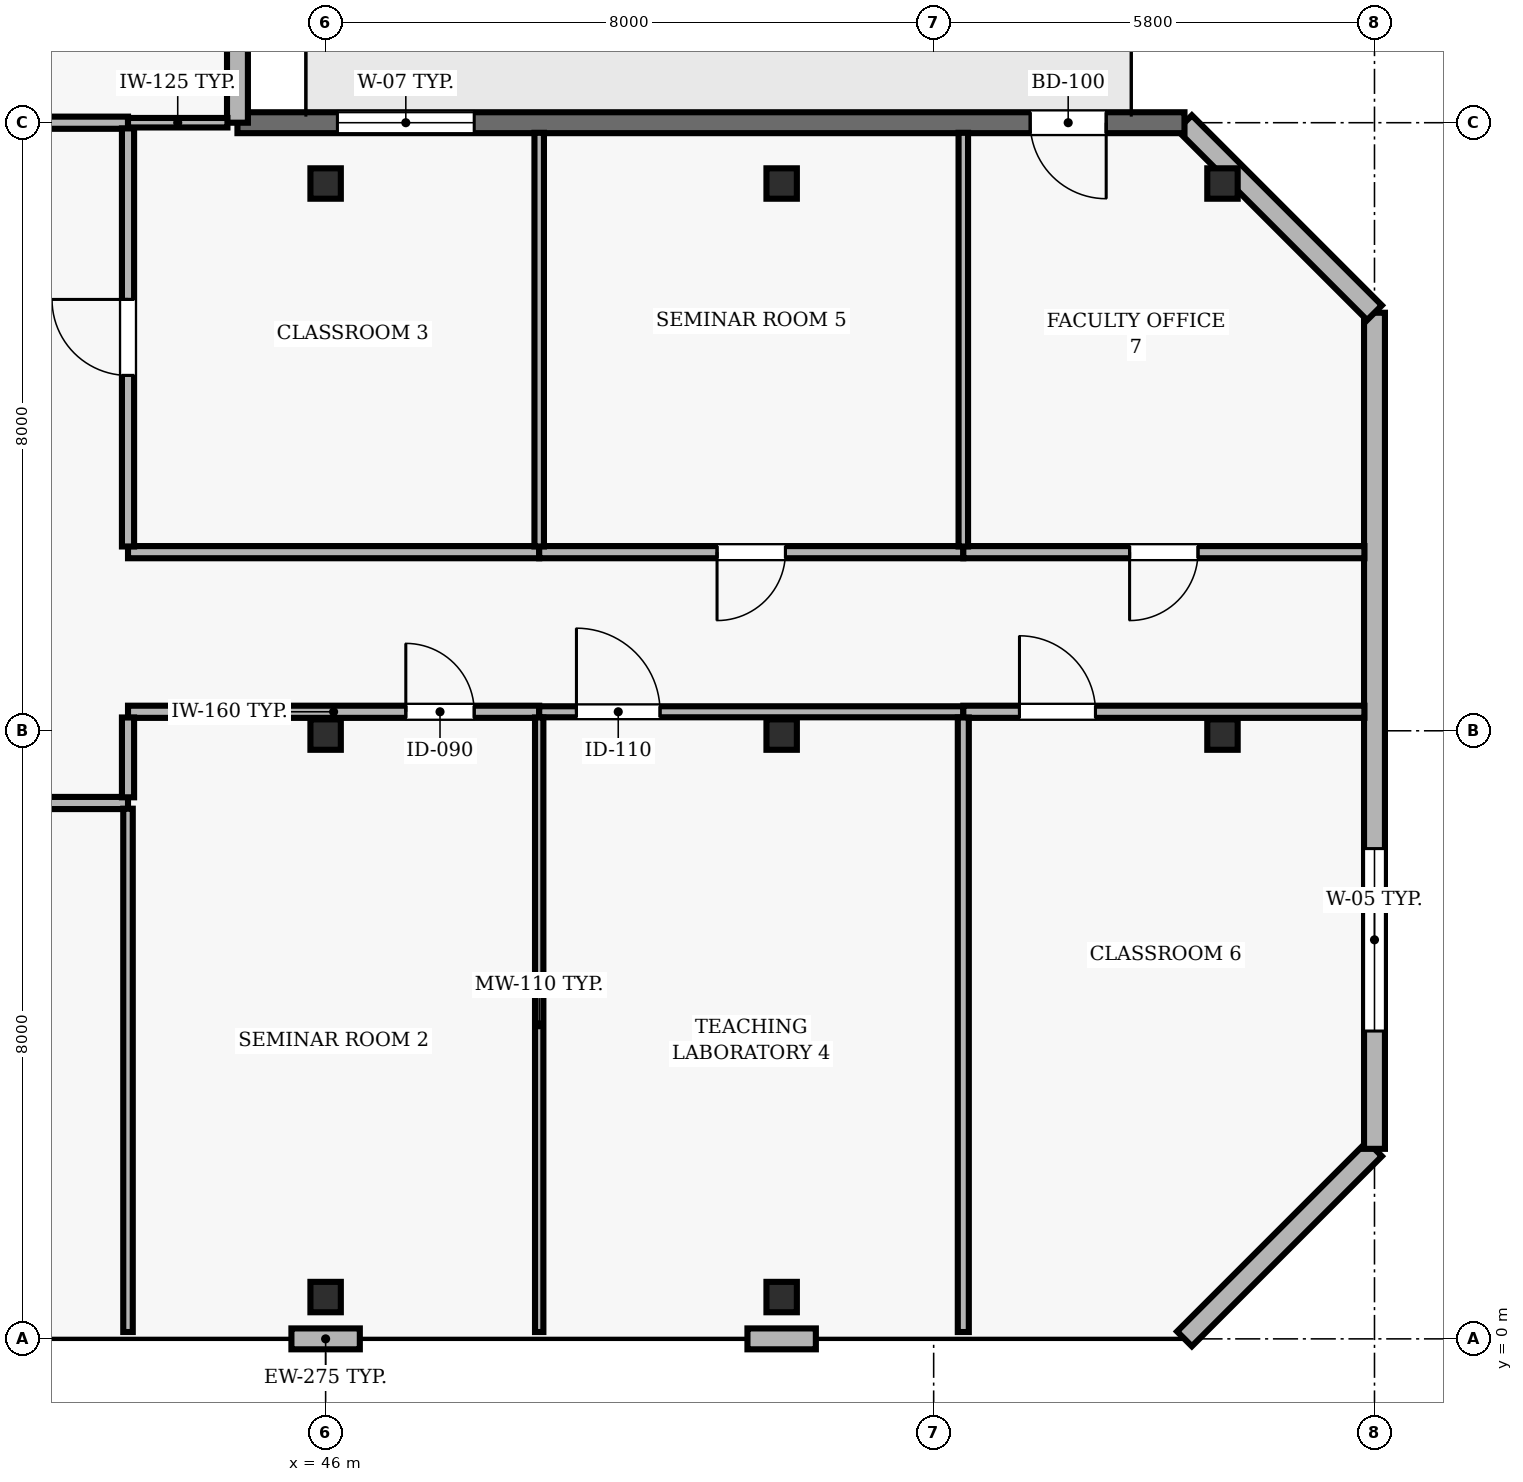
"""IFC4 building model, lengths in metres.
Left out: names, types, materials, properties, quantities, classifications, styles, units other than length and angle.
Written with IfcOpenShell. Run it as: python <this file> out.ifc"""

import sys

from ifc_helpers import new_model, si_unit, direction, frame, frame_2d, origin, origin_2d, place, context, subcontext, project, spatial, rectangle, hollow_rectangle, extrude, element, fill, save


model = new_model("IFC4")
c1 = context("Model", 3, precision=1e-05, world=origin(), true_north=direction((0.0, 1.0)))
c2 = subcontext(c1, "Body", "Model", "MODEL_VIEW")
j1 = project(units=[si_unit("LENGTHUNIT", "METRE"), si_unit("PLANEANGLEUNIT", "RADIAN")], contexts=[c1])
p1 = place(None, origin())
s1 = spatial("IfcSite", under=j1, at=p1, CompositionType="ELEMENT")
p2 = place(p1, origin())
s2 = spatial("IfcBuilding", under=s1, at=p2, CompositionType="ELEMENT")
p3 = place(p2, frame((0.0, 0.0, 256.0)))
s3 = spatial("IfcBuildingStorey", under=s2, at=p3, CompositionType="ELEMENT", Elevation=256.0)
for number, where, z_axis, x_axis in (
    (1, (46.0, 0.55, 0.0), (0.0, 0.0, 1.0), (1.0, 0.0, 0.0)),
    (2, (46.0, 7.95, 0.0), (0.0, 0.0, 1.0), (1.0, 0.0, 0.0)),
    (3, (46.0, 15.2, 0.0), (0.0, 0.0, 1.0), (1.0, 0.0, 0.0)),
    (4, (52.0, 0.55, 0.0), (0.0, 0.0, 1.0), (1.0, 0.0, 0.0)),
    (5, (52.0, 7.95, 0.0), (0.0, 0.0, 1.0), (1.0, 0.0, 0.0)),
    (6, (52.0, 15.2, 0.0), (0.0, 0.0, 1.0), (1.0, 0.0, 0.0)),
    (7, (57.8, 7.95, 0.0), (0.0, 0.0, 1.0), (1.0, 0.0, 0.0)),
    (8, (57.8, 15.2, 0.0), (0.0, 0.0, 1.0), (1.0, 0.0, 0.0)),
):
    element("IfcColumn", number, at=place(p3, frame(where, z_axis=z_axis, x_axis=x_axis)), inside=s3, PredefinedType="COLUMN", context=c2, shape_type="SweptSolid", body=[
        extrude(hollow_rectangle(XDim=0.4, YDim=0.4, WallThickness=0.02, at=origin_2d()), origin(), (0.0, 0.0, 1.0), 3.9),
    ])
for number, where, z_axis, x_axis in (
    (9, (45.55, 0.0, 0.0), (0.0, 0.0, 1.0), (1.0, 0.0, 0.0)),
    (10, (51.55, 0.0, 0.0), (0.0, 0.0, 1.0), (1.0, 0.0, 0.0)),
):
    element("IfcWall", number, at=place(p3, frame(where, z_axis=z_axis, x_axis=x_axis)), inside=s3, PredefinedType="SOLIDWALL", context=c2, shape_type="SweptSolid", body=[
        extrude(rectangle(XDim=0.9, YDim=0.275, at=frame_2d((0.45, 0.0))), origin(), (0.0, 0.0, 1.0), 3.69),
    ])
p4 = place(p3, frame((57.3, 0.0, 0.0), z_axis=(0.0, 0.0, 1.0), x_axis=(0.707106781187, 0.707106781187, 0.0)))
e11 = element("IfcWall", 11, at=p4, inside=s3, PredefinedType="SOLIDWALL", context=c2, shape_type="SweptSolid", body=[
    extrude(rectangle(XDim=3.536, YDim=0.275, at=frame_2d((1.768, 0.0))), origin(), (0.0, 0.0, 1.0), 3.69),
])
p5 = place(p3, frame((59.8, 2.5, 0.0), z_axis=(0.0, 0.0, 1.0), x_axis=(0.0, 1.0, 0.0)))
e12 = element("IfcWall", 12, at=p5, inside=s3, PredefinedType="SOLIDWALL", context=c2, shape_type="SweptSolid", body=[
    extrude(rectangle(XDim=11.0, YDim=0.275, at=frame_2d((5.5, 0.0))), origin(), (0.0, 0.0, 1.0), 3.69),
])
p6 = place(p5, frame((1.55, 0.0, 0.9)))
e13 = element("IfcOpeningElement", 13, at=p6, cuts=e12, PredefinedType="OPENING", context=c2, shape_type="SweptSolid", body=[
    extrude(rectangle(XDim=2.4, YDim=1.6, at=frame_2d((1.2, 0.8))), frame((0.0, 0.147, 0.0), z_axis=(0.0, -1.0, 0.0), x_axis=(1.0, 0.0, 0.0)), (0.0, 0.0, 1.0), 0.295),
])
p7 = place(p3, frame((59.8, 13.5, 0.0), z_axis=(0.0, 0.0, 1.0), x_axis=(-0.707106781187, 0.707106781187, 0.0)))
e14 = element("IfcWall", 14, at=p7, inside=s3, PredefinedType="SOLIDWALL", context=c2, shape_type="SweptSolid", body=[
    extrude(rectangle(XDim=3.536, YDim=0.275, at=frame_2d((1.768, 0.0))), origin(), (0.0, 0.0, 1.0), 3.69),
])
p8 = place(p3, frame((57.3, 16.0, 0.0), z_axis=(0.0, 0.0, 1.0), x_axis=(-1.0, 0.0, 0.0)))
e15 = element("IfcWall", 15, at=p8, inside=s3, PredefinedType="SOLIDWALL", context=c2, shape_type="SweptSolid", body=[
    extrude(rectangle(XDim=12.46, YDim=0.275, at=frame_2d((6.23, 0.0))), origin(), (0.0, 0.0, 1.0), 3.69),
])
p9 = place(p8, frame((1.03, 0.0, 0.0)))
e16 = element("IfcOpeningElement", 16, at=p9, cuts=e15, PredefinedType="OPENING", context=c2, shape_type="SweptSolid", body=[
    extrude(rectangle(XDim=1.0, YDim=2.2, at=frame_2d((0.5, 1.1))), frame((0.0, 0.147, 0.0), z_axis=(0.0, -1.0, 0.0), x_axis=(1.0, 0.0, 0.0)), (0.0, 0.0, 1.0), 0.295),
])
p10 = place(p8, frame((9.345, 0.0, 0.9)))
e17 = element("IfcOpeningElement", 17, at=p10, cuts=e15, PredefinedType="OPENING", context=c2, shape_type="SweptSolid", body=[
    extrude(rectangle(XDim=1.8, YDim=1.8, at=frame_2d((0.9, 0.9))), frame((0.0, 0.147, 0.0), z_axis=(0.0, -1.0, 0.0), x_axis=(1.0, 0.0, 0.0)), (0.0, 0.0, 1.0), 0.295),
])
p11 = place(p3, frame((44.84, 16.0, 0.0), z_axis=(0.0, 0.0, 1.0), x_axis=(0.0, 1.0, 0.0)))
e18 = element("IfcWall", 18, at=p11, inside=s3, PredefinedType="SOLIDWALL", context=c2, shape_type="SweptSolid", body=[
    extrude(rectangle(XDim=8.3, YDim=0.275, at=frame_2d((4.15, 0.0))), origin(), (0.0, 0.0, 1.0), 3.69),
])
p12 = place(p11, frame((2.95, 0.0, 0.9)))
e19 = element("IfcOpeningElement", 19, at=p12, cuts=e18, PredefinedType="OPENING", context=c2, shape_type="SweptSolid", body=[
    extrude(rectangle(XDim=2.4, YDim=1.8, at=frame_2d((1.2, 0.9))), frame((0.0, 0.147, 0.0), z_axis=(0.0, -1.0, 0.0), x_axis=(1.0, 0.0, 0.0)), (0.0, 0.0, 1.0), 0.295),
])
p13 = place(p3, frame((38.05, 7.05, 0.0), z_axis=(0.0, 0.0, 1.0), x_axis=(1.0, 0.0, 0.0)))
e20 = element("IfcWall", 20, at=p13, inside=s3, PredefinedType="PARTITIONING", context=c2, shape_type="SweptSolid", body=[
    extrude(rectangle(XDim=5.35, YDim=0.16, at=frame_2d((2.675, 0.0))), origin(), (0.0, 0.0, 1.0), 3.69),
])
p14 = place(p13, frame((2.175, 0.0, 0.0)))
e21 = element("IfcOpeningElement", 21, at=p14, cuts=e20, PredefinedType="OPENING", context=c2, shape_type="SweptSolid", body=[
    extrude(rectangle(XDim=1.0, YDim=2.1, at=frame_2d((0.5, 1.05))), frame((0.0, 0.09, 0.0), z_axis=(0.0, -1.0, 0.0), x_axis=(1.0, 0.0, 0.0)), (0.0, 0.0, 1.0), 0.18),
])
p15 = place(p3, frame((43.4, 8.25, 0.0), z_axis=(0.0, 0.0, 1.0), x_axis=(1.0, 0.0, 0.0)))
e22 = element("IfcWall", 22, at=p15, inside=s3, PredefinedType="PARTITIONING", context=c2, shape_type="SweptSolid", body=[
    extrude(rectangle(XDim=5.41, YDim=0.16, at=frame_2d((2.705, 0.0))), origin(), (0.0, 0.0, 1.0), 3.221),
])
p16 = place(p15, frame((3.655, 0.0, 0.0)))
e23 = element("IfcOpeningElement", 23, at=p16, cuts=e22, PredefinedType="OPENING", context=c2, shape_type="SweptSolid", body=[
    extrude(rectangle(XDim=0.9, YDim=2.1, at=frame_2d((0.45, 1.05))), frame((0.0, 0.09, 0.0), z_axis=(0.0, -1.0, 0.0), x_axis=(1.0, 0.0, 0.0)), (0.0, 0.0, 1.0), 0.18),
])
p17 = place(p3, frame((43.4, 16.0, 0.0), z_axis=(0.0, 0.0, 1.0), x_axis=(-1.0, 0.0, 0.0)))
e24 = element("IfcWall", 24, at=p17, inside=s3, PredefinedType="PARTITIONING", context=c2, shape_type="SweptSolid", body=[
    extrude(rectangle(XDim=5.35, YDim=0.16, at=frame_2d((2.675, 0.0))), origin(), (0.0, 0.0, 1.0), 3.39),
])
p18 = place(p17, frame((2.225, 0.0, 0.0)))
e25 = element("IfcOpeningElement", 25, at=p18, cuts=e24, PredefinedType="OPENING", context=c2, shape_type="SweptSolid", body=[
    extrude(rectangle(XDim=0.9, YDim=2.1, at=frame_2d((0.45, 1.05))), frame((0.0, 0.09, 0.0), z_axis=(0.0, -1.0, 0.0), x_axis=(1.0, 0.0, 0.0)), (0.0, 0.0, 1.0), 0.18),
])
p19 = place(p3, frame((43.4, 16.0, 0.0), z_axis=(0.0, 0.0, 1.0), x_axis=(1.0, 0.0, 0.0)))
e26 = element("IfcWall", 26, at=p19, inside=s3, PredefinedType="PARTITIONING", context=c2, shape_type="SweptSolid", body=[
    extrude(rectangle(XDim=1.308, YDim=0.125, at=frame_2d((0.654, 0.0))), origin(), (0.0, 0.0, 1.0), 3.39),
])
p20 = place(p3, frame((48.81, 8.25, 0.0), z_axis=(0.0, 0.0, 1.0), x_axis=(1.0, 0.0, 0.0)))
e27 = element("IfcWall", 27, at=p20, inside=s3, PredefinedType="PARTITIONING", context=c2, shape_type="SweptSolid", body=[
    extrude(rectangle(XDim=5.58, YDim=0.145, at=frame_2d((2.79, 0.0))), origin(), (0.0, 0.0, 1.0), 3.221),
])
p21 = place(p20, frame((0.49, 0.0, 0.0)))
e28 = element("IfcOpeningElement", 28, at=p21, cuts=e27, PredefinedType="OPENING", context=c2, shape_type="SweptSolid", body=[
    extrude(rectangle(XDim=1.1, YDim=2.15, at=frame_2d((0.55, 1.075))), frame((0.0, 0.083, 0.0), z_axis=(0.0, -1.0, 0.0), x_axis=(1.0, 0.0, 0.0)), (0.0, 0.0, 1.0), 0.165),
])
p22 = place(p3, frame((48.81, 10.35, 0.0), z_axis=(0.0, 0.0, 1.0), x_axis=(-1.0, 0.0, 0.0)))
e29 = element("IfcWall", 29, at=p22, inside=s3, PredefinedType="PARTITIONING", context=c2, shape_type="SweptSolid", body=[
    extrude(rectangle(XDim=5.41, YDim=0.16, at=frame_2d((2.705, 0.0))), origin(), (0.0, 0.0, 1.0), 3.372),
])
p23 = place(p3, frame((54.39, 8.25, 0.0), z_axis=(0.0, 0.0, 1.0), x_axis=(1.0, 0.0, 0.0)))
e30 = element("IfcWall", 30, at=p23, inside=s3, PredefinedType="PARTITIONING", context=c2, shape_type="SweptSolid", body=[
    extrude(rectangle(XDim=5.277, YDim=0.16, at=frame_2d((2.639, 0.0))), origin(), (0.0, 0.0, 1.0), 3.221),
])
p24 = place(p23, frame((0.739, 0.0, 0.0)))
e31 = element("IfcOpeningElement", 31, at=p24, cuts=e30, PredefinedType="OPENING", context=c2, shape_type="SweptSolid", body=[
    extrude(rectangle(XDim=1.0, YDim=2.1, at=frame_2d((0.5, 1.05))), frame((0.0, 0.09, 0.0), z_axis=(0.0, -1.0, 0.0), x_axis=(1.0, 0.0, 0.0)), (0.0, 0.0, 1.0), 0.18),
])
p25 = place(p3, frame((54.39, 10.35, 0.0), z_axis=(0.0, 0.0, 1.0), x_axis=(-1.0, 0.0, 0.0)))
e32 = element("IfcWall", 32, at=p25, inside=s3, PredefinedType="PARTITIONING", context=c2, shape_type="SweptSolid", body=[
    extrude(rectangle(XDim=5.58, YDim=0.16, at=frame_2d((2.79, 0.0))), origin(), (0.0, 0.0, 1.0), 3.372),
])
p26 = place(p25, frame((2.34, 0.0, 0.0)))
e33 = element("IfcOpeningElement", 33, at=p26, cuts=e32, PredefinedType="OPENING", context=c2, shape_type="SweptSolid", body=[
    extrude(rectangle(XDim=0.9, YDim=2.1, at=frame_2d((0.45, 1.05))), frame((0.0, 0.09, 0.0), z_axis=(0.0, -1.0, 0.0), x_axis=(1.0, 0.0, 0.0)), (0.0, 0.0, 1.0), 0.18),
])
p27 = place(p3, frame((59.667, 10.35, 0.0), z_axis=(0.0, 0.0, 1.0), x_axis=(-1.0, 0.0, 0.0)))
e34 = element("IfcWall", 34, at=p27, inside=s3, PredefinedType="PARTITIONING", context=c2, shape_type="SweptSolid", body=[
    extrude(rectangle(XDim=5.277, YDim=0.16, at=frame_2d((2.639, 0.0))), origin(), (0.0, 0.0, 1.0), 3.372),
])
p28 = place(p27, frame((2.189, 0.0, 0.0)))
e35 = element("IfcOpeningElement", 35, at=p28, cuts=e34, PredefinedType="OPENING", context=c2, shape_type="SweptSolid", body=[
    extrude(rectangle(XDim=0.9, YDim=2.1, at=frame_2d((0.45, 1.05))), frame((0.0, 0.09, 0.0), z_axis=(0.0, -1.0, 0.0), x_axis=(1.0, 0.0, 0.0)), (0.0, 0.0, 1.0), 0.18),
])
p29 = place(p3, frame((43.4, 0.09, 0.0), z_axis=(0.0, 0.0, 1.0), x_axis=(0.0, 1.0, 0.0)))
e36 = element("IfcWall", 36, at=p29, inside=s3, PredefinedType="PARTITIONING", context=c2, shape_type="SweptSolid", body=[
    extrude(rectangle(XDim=6.885, YDim=0.125, at=frame_2d((3.442, 0.0))), origin(), (0.0, 0.0, 1.0), 3.69),
])
p30 = place(p3, frame((43.4, 7.125, 0.0), z_axis=(0.0, 0.0, 1.0), x_axis=(0.0, 1.0, 0.0)))
e37 = element("IfcWall", 37, at=p30, inside=s3, PredefinedType="PARTITIONING", context=c2, shape_type="SweptSolid", body=[
    extrude(rectangle(XDim=1.05, YDim=0.16, at=frame_2d((0.525, 0.0))), origin(), (0.0, 0.0, 1.0), 3.69),
])
p31 = place(p3, frame((43.4, 10.425, 0.0), z_axis=(0.0, 0.0, 1.0), x_axis=(0.0, 1.0, 0.0)))
e38 = element("IfcWall", 38, at=p31, inside=s3, PredefinedType="PARTITIONING", context=c2, shape_type="SweptSolid", body=[
    extrude(rectangle(XDim=5.5, YDim=0.16, at=frame_2d((2.75, 0.0))), origin(), (0.0, 0.0, 1.0), 3.69),
])
p32 = place(p31, frame((2.25, 0.0, 0.0)))
e39 = element("IfcOpeningElement", 39, at=p32, cuts=e38, PredefinedType="OPENING", context=c2, shape_type="SweptSolid", body=[
    extrude(rectangle(XDim=1.0, YDim=2.1, at=frame_2d((0.5, 1.05))), frame((0.0, 0.09, 0.0), z_axis=(0.0, -1.0, 0.0), x_axis=(1.0, 0.0, 0.0)), (0.0, 0.0, 1.0), 0.18),
])
p33 = place(p3, frame((48.81, 0.09, 0.0), z_axis=(0.0, 0.0, 1.0), x_axis=(0.0, 1.0, 0.0)))
e40 = element("IfcWall", 40, at=p33, inside=s3, PredefinedType="MOVABLE", context=c2, shape_type="SweptSolid", body=[
    extrude(rectangle(XDim=8.085, YDim=0.11, at=frame_2d((4.042, 0.0))), origin(), (0.0, 0.0, 1.0), 3.69),
])
p34 = place(p3, frame((48.81, 10.425, 0.0), z_axis=(0.0, 0.0, 1.0), x_axis=(0.0, 1.0, 0.0)))
e41 = element("IfcWall", 41, at=p34, inside=s3, PredefinedType="PARTITIONING", context=c2, shape_type="SweptSolid", body=[
    extrude(rectangle(XDim=5.442, YDim=0.125, at=frame_2d((2.721, 0.0))), origin(), (0.0, 0.0, 1.0), 3.69),
])
p35 = place(p3, frame((54.39, 0.09, 0.0), z_axis=(0.0, 0.0, 1.0), x_axis=(0.0, 1.0, 0.0)))
e42 = element("IfcWall", 42, at=p35, inside=s3, PredefinedType="PARTITIONING", context=c2, shape_type="SweptSolid", body=[
    extrude(rectangle(XDim=8.085, YDim=0.145, at=frame_2d((4.042, 0.0))), origin(), (0.0, 0.0, 1.0), 3.69),
])
p36 = place(p3, frame((54.39, 10.425, 0.0), z_axis=(0.0, 0.0, 1.0), x_axis=(0.0, 1.0, 0.0)))
e43 = element("IfcWall", 43, at=p36, inside=s3, PredefinedType="PARTITIONING", context=c2, shape_type="SweptSolid", body=[
    extrude(rectangle(XDim=5.442, YDim=0.125, at=frame_2d((2.721, 0.0))), origin(), (0.0, 0.0, 1.0), 3.69),
])
p37 = place(p6, origin())
e44 = element("IfcWindow", 44, at=p37, inside=s3, PartitioningType="SINGLE_PANEL", PredefinedType="WINDOW", context=c2, shape_type="SweptSolid", body=[
    extrude(rectangle(XDim=2.4, YDim=1.6, at=frame_2d((1.2, 0.8))), frame((0.0, 0.03, 0.0), z_axis=(0.0, -1.0, 0.0), x_axis=(1.0, 0.0, 0.0)), (0.0, 0.0, 1.0), 0.06),
])
fill(e13, e44)
p38 = place(p9, origin())
e45 = element("IfcDoor", 45, at=p38, inside=s3, OperationType="SINGLE_SWING_LEFT", PredefinedType="DOOR", context=c2, shape_type="SweptSolid", body=[
    extrude(rectangle(XDim=1.0, YDim=2.2, at=frame_2d((0.5, 1.1))), frame((0.0, 0.025, 0.0), z_axis=(0.0, -1.0, 0.0), x_axis=(1.0, 0.0, 0.0)), (0.0, 0.0, 1.0), 0.05),
])
fill(e16, e45)
p39 = place(p10, origin())
e46 = element("IfcWindow", 46, at=p39, inside=s3, PartitioningType="SINGLE_PANEL", PredefinedType="WINDOW", context=c2, shape_type="SweptSolid", body=[
    extrude(rectangle(XDim=1.8, YDim=1.8, at=frame_2d((0.9, 0.9))), frame((0.0, 0.03, 0.0), z_axis=(0.0, -1.0, 0.0), x_axis=(1.0, 0.0, 0.0)), (0.0, 0.0, 1.0), 0.06),
])
fill(e17, e46)
p40 = place(p16, origin())
e47 = element("IfcDoor", 47, at=p40, inside=s3, OperationType="SINGLE_SWING_LEFT", PredefinedType="DOOR", context=c2, shape_type="SweptSolid", body=[
    extrude(rectangle(XDim=0.9, YDim=2.1, at=frame_2d((0.45, 1.05))), frame((0.0, 0.025, 0.0), z_axis=(0.0, -1.0, 0.0), x_axis=(1.0, 0.0, 0.0)), (0.0, 0.0, 1.0), 0.05),
])
fill(e23, e47)
p41 = place(p32, origin())
e48 = element("IfcDoor", 48, at=p41, inside=s3, OperationType="SINGLE_SWING_RIGHT", PredefinedType="DOOR", context=c2, shape_type="SweptSolid", body=[
    extrude(rectangle(XDim=1.0, YDim=2.1, at=frame_2d((0.5, 1.05))), frame((0.0, 0.025, 0.0), z_axis=(0.0, -1.0, 0.0), x_axis=(1.0, 0.0, 0.0)), (0.0, 0.0, 1.0), 0.05),
])
fill(e39, e48)
p42 = place(p21, origin())
e49 = element("IfcDoor", 49, at=p42, inside=s3, OperationType="SINGLE_SWING_LEFT", PredefinedType="DOOR", context=c2, shape_type="SweptSolid", body=[
    extrude(rectangle(XDim=1.1, YDim=2.15, at=frame_2d((0.55, 1.075))), frame((0.0, 0.025, 0.0), z_axis=(0.0, -1.0, 0.0), x_axis=(1.0, 0.0, 0.0)), (0.0, 0.0, 1.0), 0.05),
])
fill(e28, e49)
p43 = place(p26, origin())
e50 = element("IfcDoor", 50, at=p43, inside=s3, OperationType="SINGLE_SWING_RIGHT", PredefinedType="DOOR", context=c2, shape_type="SweptSolid", body=[
    extrude(rectangle(XDim=0.9, YDim=2.1, at=frame_2d((0.45, 1.05))), frame((0.0, 0.025, 0.0), z_axis=(0.0, -1.0, 0.0), x_axis=(1.0, 0.0, 0.0)), (0.0, 0.0, 1.0), 0.05),
])
fill(e33, e50)
p44 = place(p24, origin())
e51 = element("IfcDoor", 51, at=p44, inside=s3, OperationType="SINGLE_SWING_LEFT", PredefinedType="DOOR", context=c2, shape_type="SweptSolid", body=[
    extrude(rectangle(XDim=1.0, YDim=2.1, at=frame_2d((0.5, 1.05))), frame((0.0, 0.025, 0.0), z_axis=(0.0, -1.0, 0.0), x_axis=(1.0, 0.0, 0.0)), (0.0, 0.0, 1.0), 0.05),
])
fill(e31, e51)
p45 = place(p28, origin())
e52 = element("IfcDoor", 52, at=p45, inside=s3, OperationType="SINGLE_SWING_RIGHT", PredefinedType="DOOR", context=c2, shape_type="SweptSolid", body=[
    extrude(rectangle(XDim=0.9, YDim=2.1, at=frame_2d((0.45, 1.05))), frame((0.0, 0.025, 0.0), z_axis=(0.0, -1.0, 0.0), x_axis=(1.0, 0.0, 0.0)), (0.0, 0.0, 1.0), 0.05),
])
fill(e35, e52)
save(model, sys.argv[1])
